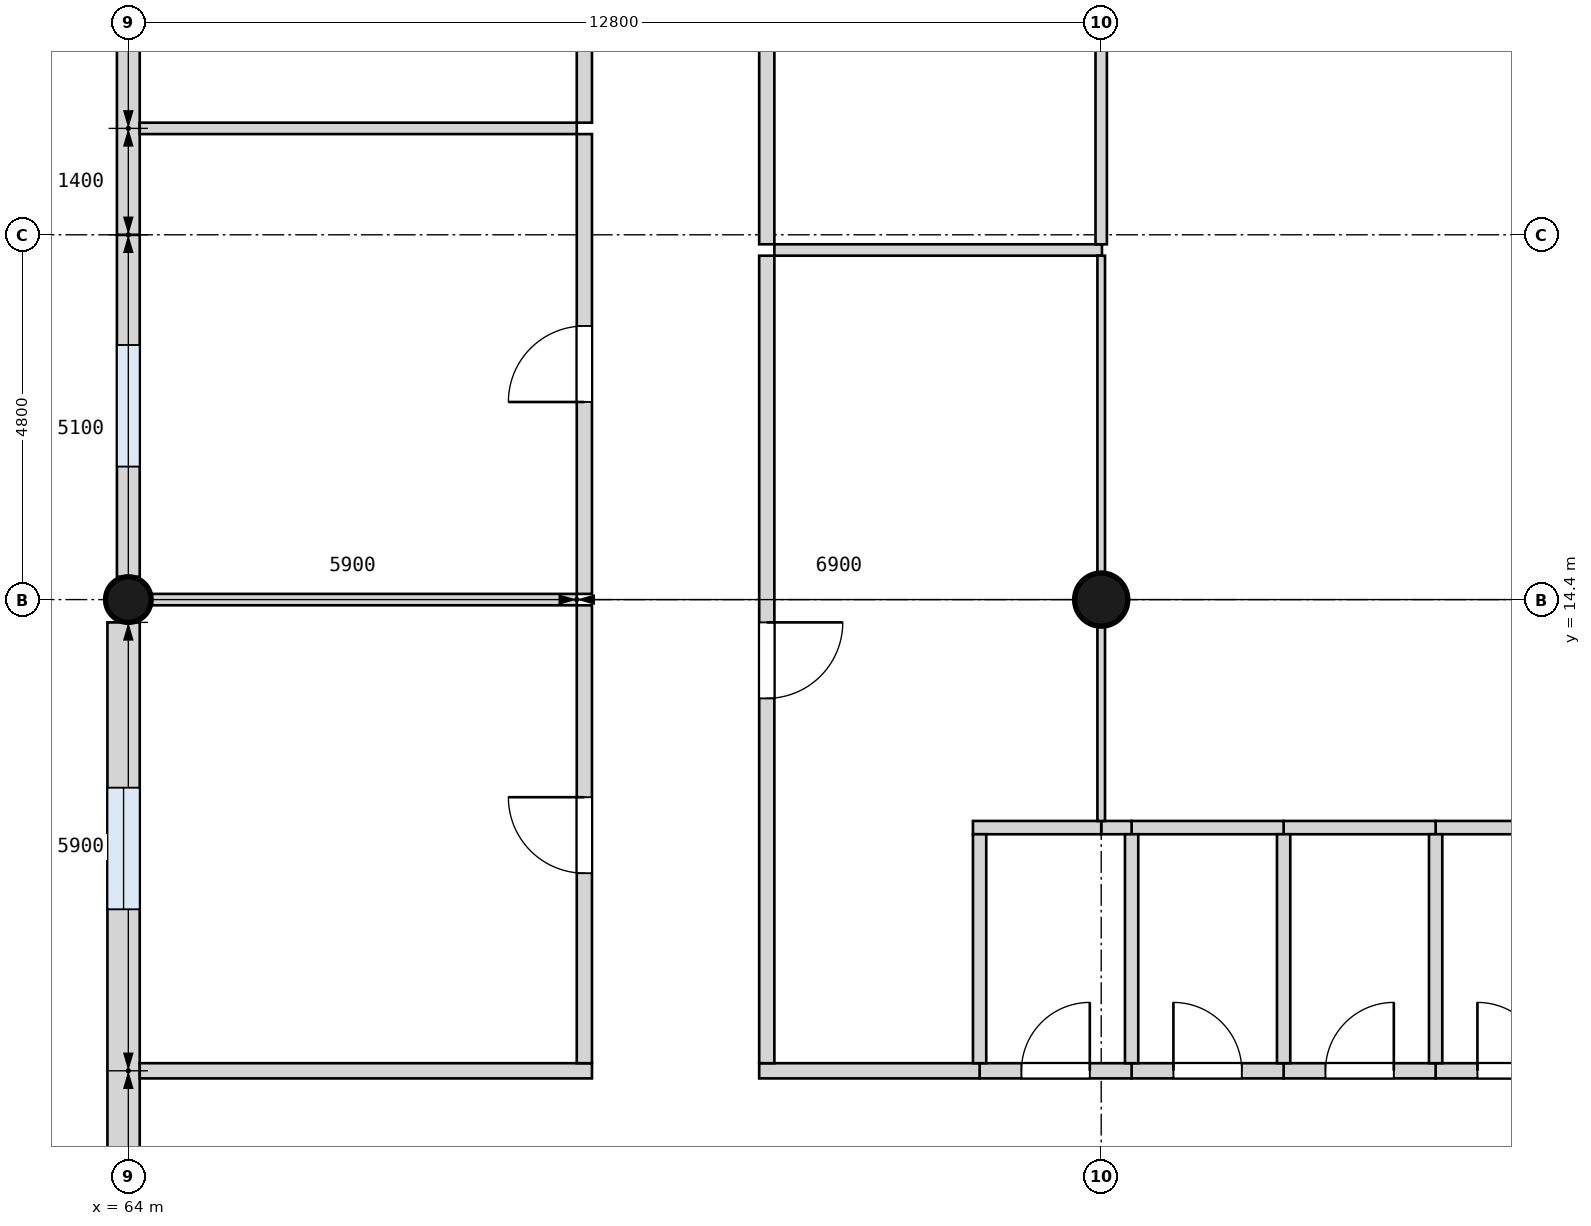
"""IFC4 building model, lengths in metres.
Left out: names, types, materials, properties, quantities, classifications, styles, units other than length and angle.
Written with IfcOpenShell. Run it as: python <this file> out.ifc"""

import sys

from ifc_helpers import new_model, si_unit, direction, frame, frame_2d, origin, origin_2d, place, context, subcontext, project, spatial, rectangle, circle, extrude, element, fill, save


model = new_model("IFC4")
c1 = context("Model", 3, precision=1e-05, world=origin(), true_north=direction((0.0, 1.0)))
c2 = subcontext(c1, "Body", "Model", "MODEL_VIEW")
j1 = project(units=[si_unit("LENGTHUNIT", "METRE"), si_unit("PLANEANGLEUNIT", "RADIAN")], contexts=[c1])
p1 = place(None, origin())
s1 = spatial("IfcSite", under=j1, at=p1, CompositionType="ELEMENT")
p2 = place(p1, origin())
s2 = spatial("IfcBuilding", under=s1, at=p2, CompositionType="ELEMENT")
p3 = place(p2, frame((0.0, 0.0, 4.2)))
s3 = spatial("IfcBuildingStorey", under=s2, at=p3, CompositionType="ELEMENT", Elevation=4.2)
p4 = place(p3, frame((76.8, 14.4, 0.0), z_axis=(0.0, 0.0, 1.0), x_axis=(1.0, 0.0, 0.0)))
e1 = element("IfcColumn", 1, at=p4, inside=s3, PredefinedType="COLUMN", context=c2, shape_type="SweptSolid", body=[
    extrude(circle(Radius=0.35, at=origin_2d()), origin(), (0.0, 0.0, 1.0), 4.2),
])
p5 = place(p3, frame((64.0, 14.4, 0.0), z_axis=(0.0, 0.0, 1.0), x_axis=(1.0, 0.0, 0.0)))
e2 = element("IfcColumn", 2, at=p5, inside=s3, PredefinedType="COLUMN", context=c2, shape_type="SweptSolid", body=[
    extrude(circle(Radius=0.3, at=origin_2d()), origin(), (0.0, 0.0, 1.0), 4.2),
])
p6 = place(p3, frame((53.4, 14.4, 0.0), z_axis=(0.0, 0.0, 1.0), x_axis=(1.0, 0.0, 0.0)))
e3 = element("IfcWall", 3, at=p6, inside=s3, PredefinedType="SHEAR", context=c2, shape_type="SweptSolid", body=[
    extrude(rectangle(XDim=10.3, YDim=0.4, at=frame_2d((5.15, 0.0))), origin(), (0.0, 0.0, 1.0), 4.2),
])
p7 = place(p6, frame((7.15, 0.0, 1.1)))
e4 = element("IfcOpeningElement", 4, at=p7, cuts=e3, PredefinedType="OPENING", context=c2, shape_type="SweptSolid", body=[
    extrude(rectangle(XDim=1.2, YDim=1.5, at=frame_2d((0.6, 0.75))), frame((0.0, 0.21, 0.0), z_axis=(0.0, -1.0, 0.0), x_axis=(1.0, 0.0, 0.0)), (0.0, 0.0, 1.0), 0.42),
])
p8 = place(p3, frame((63.2, 5.0, 0.0), z_axis=(0.0, 0.0, 1.0), x_axis=(0.0, 1.0, 0.0)))
e5 = element("IfcWall", 5, at=p8, inside=s3, PredefinedType="SHEAR", context=c2, shape_type="SweptSolid", body=[
    extrude(rectangle(XDim=9.2, YDim=0.4, at=frame_2d((4.6, 0.0))), origin(), (0.0, 0.0, 1.0), 4.2),
])
p9 = place(p3, frame((63.938, 0.3, 0.0), z_axis=(0.0, 0.0, 1.0), x_axis=(0.0, 1.0, 0.0)))
e6 = element("IfcWall", 6, at=p9, inside=s3, PredefinedType="SOLIDWALL", context=c2, shape_type="SweptSolid", body=[
    extrude(rectangle(XDim=13.8, YDim=0.425, at=frame_2d((6.9, 0.0))), origin(), (0.0, 0.0, 1.0), 2.9),
])
p10 = place(p9, frame((1.425, 0.0, 1.0)))
e7 = element("IfcOpeningElement", 7, at=p10, cuts=e6, PredefinedType="OPENING", context=c2, shape_type="SweptSolid", body=[
    extrude(rectangle(XDim=1.6, YDim=1.8, at=frame_2d((0.8, 0.9))), frame((0.0, 0.222, 0.0), z_axis=(0.0, -1.0, 0.0), x_axis=(1.0, 0.0, 0.0)), (0.0, 0.0, 1.0), 0.445),
])
p11 = place(p9, frame((10.025, 0.0, 1.0)))
e8 = element("IfcOpeningElement", 8, at=p11, cuts=e6, PredefinedType="OPENING", context=c2, shape_type="SweptSolid", body=[
    extrude(rectangle(XDim=1.6, YDim=1.8, at=frame_2d((0.8, 0.9))), frame((0.0, 0.222, 0.0), z_axis=(0.0, -1.0, 0.0), x_axis=(1.0, 0.0, 0.0)), (0.0, 0.0, 1.0), 0.445),
])
p12 = place(p3, frame((64.0, 14.7, 0.0), z_axis=(0.0, 0.0, 1.0), x_axis=(0.0, 1.0, 0.0)))
e9 = element("IfcWall", 9, at=p12, inside=s3, PredefinedType="SOLIDWALL", context=c2, shape_type="SweptSolid", body=[
    extrude(rectangle(XDim=4.5, YDim=0.3, at=frame_2d((2.25, 0.0))), origin(), (0.0, 0.0, 1.0), 2.9),
])
p13 = place(p12, frame((1.45, 0.0, 1.0)))
e10 = element("IfcOpeningElement", 10, at=p13, cuts=e9, PredefinedType="OPENING", context=c2, shape_type="SweptSolid", body=[
    extrude(rectangle(XDim=1.6, YDim=1.8, at=frame_2d((0.8, 0.9))), frame((0.0, 0.16, 0.0), z_axis=(0.0, -1.0, 0.0), x_axis=(1.0, 0.0, 0.0)), (0.0, 0.0, 1.0), 0.32),
])
p14 = place(p3, frame((64.0, 19.2, 0.0), z_axis=(0.0, 0.0, 1.0), x_axis=(0.0, 1.0, 0.0)))
e11 = element("IfcWall", 11, at=p14, inside=s3, PredefinedType="SOLIDWALL", context=c2, shape_type="SweptSolid", body=[
    extrude(rectangle(XDim=9.6, YDim=0.3, at=frame_2d((4.8, 0.0))), origin(), (0.0, 0.0, 1.0), 2.9),
])
p15 = place(p14, frame((4.0, 0.0, 1.0)))
e12 = element("IfcOpeningElement", 12, at=p15, cuts=e11, PredefinedType="OPENING", context=c2, shape_type="SweptSolid", body=[
    extrude(rectangle(XDim=1.6, YDim=1.8, at=frame_2d((0.8, 0.9))), frame((0.0, 0.16, 0.0), z_axis=(0.0, -1.0, 0.0), x_axis=(1.0, 0.0, 0.0)), (0.0, 0.0, 1.0), 0.32),
])
p16 = place(p14, frame((7.2, 0.0, 1.0)))
e13 = element("IfcOpeningElement", 13, at=p16, cuts=e11, PredefinedType="OPENING", context=c2, shape_type="SweptSolid", body=[
    extrude(rectangle(XDim=1.6, YDim=1.8, at=frame_2d((0.8, 0.9))), frame((0.0, 0.16, 0.0), z_axis=(0.0, -1.0, 0.0), x_axis=(1.0, 0.0, 0.0)), (0.0, 0.0, 1.0), 0.32),
])
p17 = place(p3, frame((83.2, 8.2, 0.0), z_axis=(0.0, 0.0, 1.0), x_axis=(-1.0, 0.0, 0.0)))
e14 = element("IfcWall", 14, at=p17, inside=s3, PredefinedType="PARTITIONING", context=c2, shape_type="SweptSolid", body=[
    extrude(rectangle(XDim=2.0, YDim=0.2, at=frame_2d((1.0, 0.0))), origin(), (0.0, 0.0, 1.0), 3.9),
])
p18 = place(p17, frame((0.55, 0.0, 0.0)))
e15 = element("IfcOpeningElement", 15, at=p18, cuts=e14, PredefinedType="OPENING", context=c2, shape_type="SweptSolid", body=[
    extrude(rectangle(XDim=0.9, YDim=2.1, at=frame_2d((0.45, 1.05))), frame((0.0, 0.11, 0.0), z_axis=(0.0, -1.0, 0.0), x_axis=(1.0, 0.0, 0.0)), (0.0, 0.0, 1.0), 0.22),
])
p19 = place(p3, frame((81.2, 8.2, 0.0), z_axis=(0.0, 0.0, 1.0), x_axis=(-1.0, 0.0, 0.0)))
e16 = element("IfcWall", 16, at=p19, inside=s3, PredefinedType="PARTITIONING", context=c2, shape_type="SweptSolid", body=[
    extrude(rectangle(XDim=2.0, YDim=0.2, at=frame_2d((1.0, 0.0))), origin(), (0.0, 0.0, 1.0), 3.9),
])
p20 = place(p19, frame((0.55, 0.0, 0.0)))
e17 = element("IfcOpeningElement", 17, at=p20, cuts=e16, PredefinedType="OPENING", context=c2, shape_type="SweptSolid", body=[
    extrude(rectangle(XDim=0.9, YDim=2.1, at=frame_2d((0.45, 1.05))), frame((0.0, 0.11, 0.0), z_axis=(0.0, -1.0, 0.0), x_axis=(1.0, 0.0, 0.0)), (0.0, 0.0, 1.0), 0.22),
])
p21 = place(p3, frame((79.2, 8.2, 0.0), z_axis=(0.0, 0.0, 1.0), x_axis=(-1.0, 0.0, 0.0)))
e18 = element("IfcWall", 18, at=p21, inside=s3, PredefinedType="PARTITIONING", context=c2, shape_type="SweptSolid", body=[
    extrude(rectangle(XDim=2.0, YDim=0.2, at=frame_2d((1.0, 0.0))), origin(), (0.0, 0.0, 1.0), 3.9),
])
p22 = place(p21, frame((0.55, 0.0, 0.0)))
e19 = element("IfcOpeningElement", 19, at=p22, cuts=e18, PredefinedType="OPENING", context=c2, shape_type="SweptSolid", body=[
    extrude(rectangle(XDim=0.9, YDim=2.1, at=frame_2d((0.45, 1.05))), frame((0.0, 0.11, 0.0), z_axis=(0.0, -1.0, 0.0), x_axis=(1.0, 0.0, 0.0)), (0.0, 0.0, 1.0), 0.22),
])
p23 = place(p3, frame((77.2, 8.2, 0.0), z_axis=(0.0, 0.0, 1.0), x_axis=(-1.0, 0.0, 0.0)))
e20 = element("IfcWall", 20, at=p23, inside=s3, PredefinedType="PARTITIONING", context=c2, shape_type="SweptSolid", body=[
    extrude(rectangle(XDim=2.0, YDim=0.2, at=frame_2d((1.0, 0.0))), origin(), (0.0, 0.0, 1.0), 3.9),
])
p24 = place(p23, frame((0.55, 0.0, 0.0)))
e21 = element("IfcOpeningElement", 21, at=p24, cuts=e20, PredefinedType="OPENING", context=c2, shape_type="SweptSolid", body=[
    extrude(rectangle(XDim=0.9, YDim=2.1, at=frame_2d((0.45, 1.05))), frame((0.0, 0.11, 0.0), z_axis=(0.0, -1.0, 0.0), x_axis=(1.0, 0.0, 0.0)), (0.0, 0.0, 1.0), 0.22),
])
p25 = place(p3, frame((75.2, 8.2, 0.0), z_axis=(0.0, 0.0, 1.0), x_axis=(-1.0, 0.0, 0.0)))
e22 = element("IfcWall", 22, at=p25, inside=s3, PredefinedType="PARTITIONING", context=c2, shape_type="SweptSolid", body=[
    extrude(rectangle(XDim=2.9, YDim=0.2, at=frame_2d((1.45, 0.0))), origin(), (0.0, 0.0, 1.0), 3.9),
])
p26 = place(p3, frame((70.1, 8.2, 0.0), z_axis=(0.0, 0.0, 1.0), x_axis=(-1.0, 0.0, 0.0)))
e23 = element("IfcWall", 23, at=p26, inside=s3, PredefinedType="PARTITIONING", context=c2, shape_type="SweptSolid", body=[
    extrude(rectangle(XDim=5.95, YDim=0.2, at=frame_2d((2.975, 0.0))), origin(), (0.0, 0.0, 1.0), 3.9),
])
p27 = place(p3, frame((83.288, 11.4, 0.0), z_axis=(0.0, 0.0, 1.0), x_axis=(-1.0, 0.0, 0.0)))
e24 = element("IfcWall", 24, at=p27, inside=s3, PredefinedType="PARTITIONING", context=c2, shape_type="SweptSolid", body=[
    extrude(rectangle(XDim=2.088, YDim=0.175, at=frame_2d((1.044, 0.0))), origin(), (0.0, 0.0, 1.0), 3.9),
])
for number, where, z_axis, x_axis in (
    (25, (81.2, 11.4, 0.0), (0.0, 0.0, 1.0), (-1.0, 0.0, 0.0)),
    (26, (79.2, 11.4, 0.0), (0.0, 0.0, 1.0), (-1.0, 0.0, 0.0)),
):
    element("IfcWall", number, at=place(p3, frame(where, z_axis=z_axis, x_axis=x_axis)), inside=s3, PredefinedType="PARTITIONING", context=c2, shape_type="SweptSolid", body=[
        extrude(rectangle(XDim=2.0, YDim=0.175, at=frame_2d((1.0, 0.0))), origin(), (0.0, 0.0, 1.0), 3.9),
    ])
p28 = place(p3, frame((77.2, 11.4, 0.0), z_axis=(0.0, 0.0, 1.0), x_axis=(-1.0, 0.0, 0.0)))
e27 = element("IfcWall", 27, at=p28, inside=s3, PredefinedType="PARTITIONING", context=c2, shape_type="SweptSolid", body=[
    extrude(rectangle(XDim=0.4, YDim=0.175, at=frame_2d((0.2, 0.0))), origin(), (0.0, 0.0, 1.0), 3.9),
])
p29 = place(p3, frame((76.8, 11.4, 0.0), z_axis=(0.0, 0.0, 1.0), x_axis=(-1.0, 0.0, 0.0)))
e28 = element("IfcWall", 28, at=p29, inside=s3, PredefinedType="PARTITIONING", context=c2, shape_type="SweptSolid", body=[
    extrude(rectangle(XDim=1.688, YDim=0.175, at=frame_2d((0.844, 0.0))), origin(), (0.0, 0.0, 1.0), 3.9),
])
p30 = place(p3, frame((69.9, 14.4, 0.0), z_axis=(0.0, 0.0, 1.0), x_axis=(-1.0, 0.0, 0.0)))
e29 = element("IfcWall", 29, at=p30, inside=s3, PredefinedType="PARTITIONING", context=c2, shape_type="SweptSolid", body=[
    extrude(rectangle(XDim=5.63, YDim=0.15, at=frame_2d((2.815, 0.0))), origin(), (0.0, 0.0, 1.0), 3.0),
])
p31 = place(p3, frame((76.81, 19.0, 0.0), z_axis=(0.0, 0.0, 1.0), x_axis=(-1.0, 0.0, 0.0)))
e30 = element("IfcWall", 30, at=p31, inside=s3, PredefinedType="PARTITIONING", context=c2, shape_type="SweptSolid", body=[
    extrude(rectangle(XDim=4.31, YDim=0.15, at=frame_2d((2.155, 0.0))), origin(), (0.0, 0.0, 1.0), 3.9),
])
p32 = place(p3, frame((69.9, 20.6, 0.0), z_axis=(0.0, 0.0, 1.0), x_axis=(-1.0, 0.0, 0.0)))
e31 = element("IfcWall", 31, at=p32, inside=s3, PredefinedType="PARTITIONING", context=c2, shape_type="SweptSolid", body=[
    extrude(rectangle(XDim=5.75, YDim=0.15, at=frame_2d((2.875, 0.0))), origin(), (0.0, 0.0, 1.0), 3.9),
])
for number, where, z_axis, x_axis in (
    (32, (81.2, 8.3, 0.0), (0.0, 0.0, 1.0), (0.0, 1.0, 0.0)),
    (33, (79.2, 8.3, 0.0), (0.0, 0.0, 1.0), (0.0, 1.0, 0.0)),
    (34, (77.2, 8.3, 0.0), (0.0, 0.0, 1.0), (0.0, 1.0, 0.0)),
):
    element("IfcWall", number, at=place(p3, frame(where, z_axis=z_axis, x_axis=x_axis)), inside=s3, PredefinedType="PARTITIONING", context=c2, shape_type="SweptSolid", body=[
        extrude(rectangle(XDim=3.012, YDim=0.175, at=frame_2d((1.506, 0.0))), origin(), (0.0, 0.0, 1.0), 3.9),
    ])
p33 = place(p3, frame((76.8, 11.488, 0.0), z_axis=(0.0, 0.0, 1.0), x_axis=(0.0, 1.0, 0.0)))
e35 = element("IfcWall", 35, at=p33, inside=s3, PredefinedType="PARTITIONING", context=c2, shape_type="SweptSolid", body=[
    extrude(rectangle(XDim=2.593, YDim=0.1, at=frame_2d((1.296, 0.0))), origin(), (0.0, 0.0, 1.0), 2.9),
])
p34 = place(p3, frame((76.8, 14.72, 0.0), z_axis=(0.0, 0.0, 1.0), x_axis=(0.0, 1.0, 0.0)))
e36 = element("IfcWall", 36, at=p34, inside=s3, PredefinedType="PARTITIONING", context=c2, shape_type="SweptSolid", body=[
    extrude(rectangle(XDim=4.205, YDim=0.1, at=frame_2d((2.103, 0.0))), origin(), (0.0, 0.0, 1.0), 2.9),
])
p35 = place(p3, frame((76.8, 19.075, 0.0), z_axis=(0.0, 0.0, 1.0), x_axis=(0.0, 1.0, 0.0)))
e37 = element("IfcWall", 37, at=p35, inside=s3, PredefinedType="PARTITIONING", context=c2, shape_type="SweptSolid", body=[
    extrude(rectangle(XDim=9.405, YDim=0.15, at=frame_2d((4.703, 0.0))), origin(), (0.0, 0.0, 1.0), 2.9),
])
p36 = place(p3, frame((75.2, 8.3, 0.0), z_axis=(0.0, 0.0, 1.0), x_axis=(0.0, 1.0, 0.0)))
e38 = element("IfcWall", 38, at=p36, inside=s3, PredefinedType="PARTITIONING", context=c2, shape_type="SweptSolid", body=[
    extrude(rectangle(XDim=3.012, YDim=0.175, at=frame_2d((1.506, 0.0))), origin(), (0.0, 0.0, 1.0), 3.9),
])
p37 = place(p3, frame((72.4, 8.3, 0.0), z_axis=(0.0, 0.0, 1.0), x_axis=(0.0, 1.0, 0.0)))
e39 = element("IfcWall", 39, at=p37, inside=s3, PredefinedType="PARTITIONING", context=c2, shape_type="SweptSolid", body=[
    extrude(rectangle(XDim=10.625, YDim=0.2, at=frame_2d((5.312, 0.0))), origin(), (0.0, 0.0, 1.0), 3.9),
])
p38 = place(p37, frame((4.8, 0.0, 0.0)))
e40 = element("IfcOpeningElement", 40, at=p38, cuts=e39, PredefinedType="OPENING", context=c2, shape_type="SweptSolid", body=[
    extrude(rectangle(XDim=1.0, YDim=2.1, at=frame_2d((0.5, 1.05))), frame((0.0, 0.11, 0.0), z_axis=(0.0, -1.0, 0.0), x_axis=(1.0, 0.0, 0.0)), (0.0, 0.0, 1.0), 0.22),
])
p39 = place(p3, frame((72.4, 19.075, 0.0), z_axis=(0.0, 0.0, 1.0), x_axis=(0.0, 1.0, 0.0)))
e41 = element("IfcWall", 41, at=p39, inside=s3, PredefinedType="PARTITIONING", context=c2, shape_type="SweptSolid", body=[
    extrude(rectangle(XDim=9.625, YDim=0.2, at=frame_2d((4.812, 0.0))), origin(), (0.0, 0.0, 1.0), 3.9),
])
p40 = place(p39, frame((4.425, 0.0, 0.0)))
e42 = element("IfcOpeningElement", 42, at=p40, cuts=e41, PredefinedType="OPENING", context=c2, shape_type="SweptSolid", body=[
    extrude(rectangle(XDim=1.0, YDim=2.1, at=frame_2d((0.5, 1.05))), frame((0.0, 0.11, 0.0), z_axis=(0.0, -1.0, 0.0), x_axis=(1.0, 0.0, 0.0)), (0.0, 0.0, 1.0), 0.22),
])
p41 = place(p3, frame((70.0, 8.3, 0.0), z_axis=(0.0, 0.0, 1.0), x_axis=(0.0, 1.0, 0.0)))
e43 = element("IfcWall", 43, at=p41, inside=s3, PredefinedType="PARTITIONING", context=c2, shape_type="SweptSolid", body=[
    extrude(rectangle(XDim=6.025, YDim=0.2, at=frame_2d((3.012, 0.0))), origin(), (0.0, 0.0, 1.0), 3.9),
])
p42 = place(p41, frame((2.5, 0.0, 0.0)))
e44 = element("IfcOpeningElement", 44, at=p42, cuts=e43, PredefinedType="OPENING", context=c2, shape_type="SweptSolid", body=[
    extrude(rectangle(XDim=1.0, YDim=2.1, at=frame_2d((0.5, 1.05))), frame((0.0, 0.11, 0.0), z_axis=(0.0, -1.0, 0.0), x_axis=(1.0, 0.0, 0.0)), (0.0, 0.0, 1.0), 0.22),
])
p43 = place(p3, frame((70.0, 14.475, 0.0), z_axis=(0.0, 0.0, 1.0), x_axis=(0.0, 1.0, 0.0)))
e45 = element("IfcWall", 45, at=p43, inside=s3, PredefinedType="PARTITIONING", context=c2, shape_type="SweptSolid", body=[
    extrude(rectangle(XDim=6.05, YDim=0.2, at=frame_2d((3.025, 0.0))), origin(), (0.0, 0.0, 1.0), 3.9),
])
p44 = place(p43, frame((2.525, 0.0, 0.0)))
e46 = element("IfcOpeningElement", 46, at=p44, cuts=e45, PredefinedType="OPENING", context=c2, shape_type="SweptSolid", body=[
    extrude(rectangle(XDim=1.0, YDim=2.1, at=frame_2d((0.5, 1.05))), frame((0.0, 0.11, 0.0), z_axis=(0.0, -1.0, 0.0), x_axis=(1.0, 0.0, 0.0)), (0.0, 0.0, 1.0), 0.22),
])
p45 = place(p3, frame((70.0, 20.675, 0.0), z_axis=(0.0, 0.0, 1.0), x_axis=(0.0, 1.0, 0.0)))
e47 = element("IfcWall", 47, at=p45, inside=s3, PredefinedType="PARTITIONING", context=c2, shape_type="SweptSolid", body=[
    extrude(rectangle(XDim=8.025, YDim=0.2, at=frame_2d((4.012, 0.0))), origin(), (0.0, 0.0, 1.0), 3.9),
])
p46 = place(p45, frame((3.125, 0.0, 0.0)))
e48 = element("IfcOpeningElement", 48, at=p46, cuts=e47, PredefinedType="OPENING", context=c2, shape_type="SweptSolid", body=[
    extrude(rectangle(XDim=1.8, YDim=2.1, at=frame_2d((0.9, 1.05))), frame((0.0, 0.11, 0.0), z_axis=(0.0, -1.0, 0.0), x_axis=(1.0, 0.0, 0.0)), (0.0, 0.0, 1.0), 0.22),
])
p47 = place(p18, frame((0.9, 0.0, 0.0), z_axis=(0.0, 0.0, 1.0), x_axis=(-1.0, 0.0, 0.0)))
e49 = element("IfcDoor", 49, at=p47, inside=s3, OperationType="SINGLE_SWING_LEFT", PredefinedType="DOOR", context=c2, shape_type="SweptSolid", body=[
    extrude(rectangle(XDim=0.9, YDim=2.1, at=frame_2d((0.45, 1.05))), frame((0.0, 0.025, 0.0), z_axis=(0.0, -1.0, 0.0), x_axis=(1.0, 0.0, 0.0)), (0.0, 0.0, 1.0), 0.05),
])
fill(e15, e49)
p48 = place(p20, frame((0.9, 0.0, 0.0), z_axis=(0.0, 0.0, 1.0), x_axis=(-1.0, 0.0, 0.0)))
e50 = element("IfcDoor", 50, at=p48, inside=s3, OperationType="SINGLE_SWING_RIGHT", PredefinedType="DOOR", context=c2, shape_type="SweptSolid", body=[
    extrude(rectangle(XDim=0.9, YDim=2.1, at=frame_2d((0.45, 1.05))), frame((0.0, 0.025, 0.0), z_axis=(0.0, -1.0, 0.0), x_axis=(1.0, 0.0, 0.0)), (0.0, 0.0, 1.0), 0.05),
])
fill(e17, e50)
p49 = place(p22, frame((0.9, 0.0, 0.0), z_axis=(0.0, 0.0, 1.0), x_axis=(-1.0, 0.0, 0.0)))
e51 = element("IfcDoor", 51, at=p49, inside=s3, OperationType="SINGLE_SWING_LEFT", PredefinedType="DOOR", context=c2, shape_type="SweptSolid", body=[
    extrude(rectangle(XDim=0.9, YDim=2.1, at=frame_2d((0.45, 1.05))), frame((0.0, 0.025, 0.0), z_axis=(0.0, -1.0, 0.0), x_axis=(1.0, 0.0, 0.0)), (0.0, 0.0, 1.0), 0.05),
])
fill(e19, e51)
p50 = place(p24, frame((0.9, 0.0, 0.0), z_axis=(0.0, 0.0, 1.0), x_axis=(-1.0, 0.0, 0.0)))
e52 = element("IfcDoor", 52, at=p50, inside=s3, OperationType="SINGLE_SWING_RIGHT", PredefinedType="DOOR", context=c2, shape_type="SweptSolid", body=[
    extrude(rectangle(XDim=0.9, YDim=2.1, at=frame_2d((0.45, 1.05))), frame((0.0, 0.025, 0.0), z_axis=(0.0, -1.0, 0.0), x_axis=(1.0, 0.0, 0.0)), (0.0, 0.0, 1.0), 0.05),
])
fill(e21, e52)
p51 = place(p42, origin())
e53 = element("IfcDoor", 53, at=p51, inside=s3, OperationType="SINGLE_SWING_RIGHT", PredefinedType="DOOR", context=c2, shape_type="SweptSolid", body=[
    extrude(rectangle(XDim=1.0, YDim=2.1, at=frame_2d((0.5, 1.05))), frame((0.0, 0.025, 0.0), z_axis=(0.0, -1.0, 0.0), x_axis=(1.0, 0.0, 0.0)), (0.0, 0.0, 1.0), 0.05),
])
fill(e44, e53)
p52 = place(p44, origin())
e54 = element("IfcDoor", 54, at=p52, inside=s3, OperationType="SINGLE_SWING_LEFT", PredefinedType="DOOR", context=c2, shape_type="SweptSolid", body=[
    extrude(rectangle(XDim=1.0, YDim=2.1, at=frame_2d((0.5, 1.05))), frame((0.0, 0.025, 0.0), z_axis=(0.0, -1.0, 0.0), x_axis=(1.0, 0.0, 0.0)), (0.0, 0.0, 1.0), 0.05),
])
fill(e46, e54)
p53 = place(p38, frame((1.0, 0.0, 0.0), z_axis=(0.0, 0.0, 1.0), x_axis=(-1.0, 0.0, 0.0)))
e55 = element("IfcDoor", 55, at=p53, inside=s3, OperationType="SINGLE_SWING_LEFT", PredefinedType="DOOR", context=c2, shape_type="SweptSolid", body=[
    extrude(rectangle(XDim=1.0, YDim=2.1, at=frame_2d((0.5, 1.05))), frame((0.0, 0.025, 0.0), z_axis=(0.0, -1.0, 0.0), x_axis=(1.0, 0.0, 0.0)), (0.0, 0.0, 1.0), 0.05),
])
fill(e40, e55)
p54 = place(p11, origin())
e56 = element("IfcWindow", 56, at=p54, inside=s3, PartitioningType="SINGLE_PANEL", PredefinedType="WINDOW", context=c2, shape_type="SweptSolid", body=[
    extrude(rectangle(XDim=1.6, YDim=1.8, at=frame_2d((0.8, 0.9))), frame((0.0, 0.03, 0.0), z_axis=(0.0, -1.0, 0.0), x_axis=(1.0, 0.0, 0.0)), (0.0, 0.0, 1.0), 0.06),
])
fill(e8, e56)
p55 = place(p13, origin())
e57 = element("IfcWindow", 57, at=p55, inside=s3, PartitioningType="SINGLE_PANEL", PredefinedType="WINDOW", context=c2, shape_type="SweptSolid", body=[
    extrude(rectangle(XDim=1.6, YDim=1.8, at=frame_2d((0.8, 0.9))), frame((0.0, 0.03, 0.0), z_axis=(0.0, -1.0, 0.0), x_axis=(1.0, 0.0, 0.0)), (0.0, 0.0, 1.0), 0.06),
])
fill(e10, e57)
save(model, sys.argv[1])
